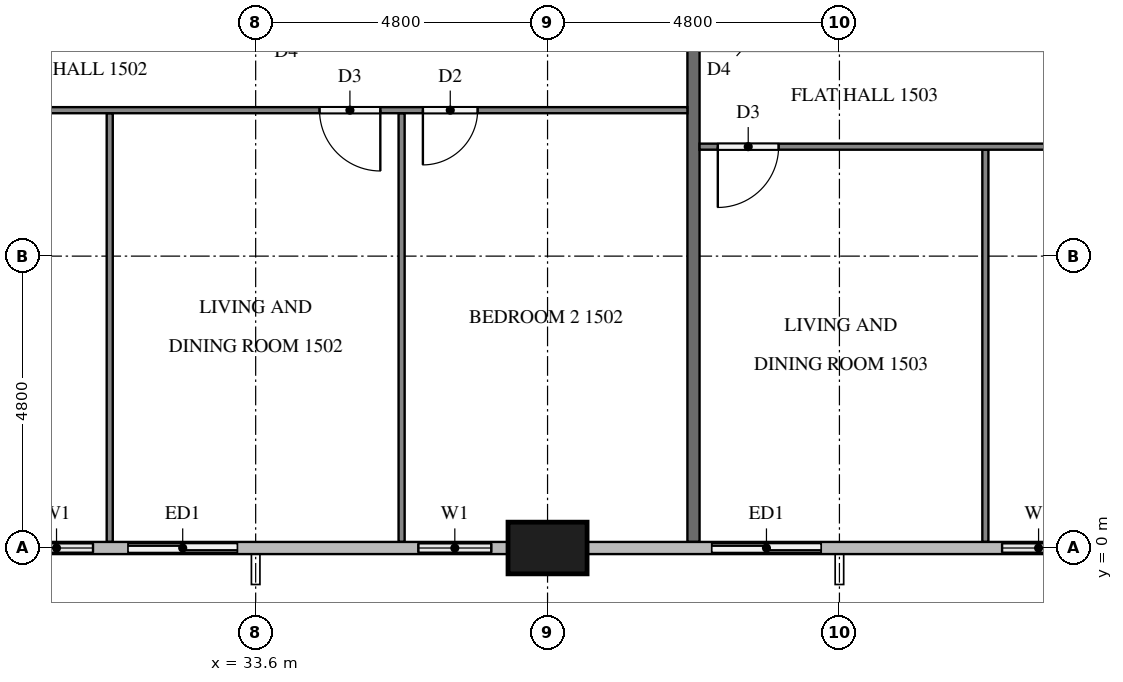
"""IFC4 building model, lengths in metres.
Left out: names, types, materials, properties, quantities, classifications, styles, units other than length and angle.
Written with IfcOpenShell. Run it as: python <this file> out.ifc"""

import sys

from ifc_helpers import new_model, si_unit, direction, frame, frame_2d, origin, origin_2d, place, context, subcontext, project, spatial, rectangle, extrude, element, fill, save


model = new_model("IFC4")
c1 = context("Model", 3, precision=1e-05, world=origin(), true_north=direction((0.0, 1.0)))
c2 = subcontext(c1, "Body", "Model", "MODEL_VIEW")
j1 = project(units=[si_unit("LENGTHUNIT", "METRE"), si_unit("PLANEANGLEUNIT", "RADIAN")], contexts=[c1])
p1 = place(None, origin())
s1 = spatial("IfcSite", under=j1, at=p1, CompositionType="ELEMENT")
p2 = place(p1, origin())
s2 = spatial("IfcBuilding", under=s1, at=p2, CompositionType="ELEMENT")
p3 = place(p2, frame((0.0, 0.0, 62.8)))
s3 = spatial("IfcBuildingStorey", under=s2, at=p3, CompositionType="ELEMENT", Elevation=62.8)
p4 = place(p3, frame((38.4, 0.0, 0.0), z_axis=(0.0, 0.0, 1.0), x_axis=(1.0, 0.0, 0.0)))
e1 = element("IfcColumn", 1, at=p4, inside=s3, PredefinedType="COLUMN", context=c2, shape_type="SweptSolid", body=[
    extrude(rectangle(XDim=1.3, YDim=0.85, at=origin_2d()), origin(), (0.0, 0.0, 1.0), 3.2),
])
p5 = place(p3, frame((29.45, 0.0, 0.0), z_axis=(0.0, 0.0, 1.0), x_axis=(1.0, 0.0, 0.0)))
e2 = element("IfcWall", 2, at=p5, inside=s3, PredefinedType="SOLIDWALL", context=c2, shape_type="SweptSolid", body=[
    extrude(rectangle(XDim=4.15, YDim=0.15, at=frame_2d((2.075, 0.0))), origin(), (0.0, 0.0, 1.0), 3.2),
])
p6 = place(p5, frame((0.275, 0.0, 0.9)))
e3 = element("IfcOpeningElement", 3, at=p6, cuts=e2, PredefinedType="OPENING", context=c2, shape_type="SweptSolid", body=[
    extrude(rectangle(XDim=1.2, YDim=1.4, at=frame_2d((0.6, 0.7))), frame((0.0, 0.085, 0.0), z_axis=(0.0, -1.0, 0.0), x_axis=(1.0, 0.0, 0.0)), (0.0, 0.0, 1.0), 0.17),
])
p7 = place(p5, frame((2.05, 0.0, 0.0)))
e4 = element("IfcOpeningElement", 4, at=p7, cuts=e2, PredefinedType="OPENING", context=c2, shape_type="SweptSolid", body=[
    extrude(rectangle(XDim=1.8, YDim=2.4, at=frame_2d((0.9, 1.2))), frame((0.0, 0.085, 0.0), z_axis=(0.0, -1.0, 0.0), x_axis=(1.0, 0.0, 0.0)), (0.0, 0.0, 1.0), 0.17),
])
p8 = place(p3, frame((36.0, 0.0, 0.0), z_axis=(0.0, 0.0, 1.0), x_axis=(1.0, 0.0, 0.0)))
e5 = element("IfcWall", 5, at=p8, inside=s3, PredefinedType="SOLIDWALL", context=c2, shape_type="SweptSolid", body=[
    extrude(rectangle(XDim=1.75, YDim=0.15, at=frame_2d((0.875, 0.0))), origin(), (0.0, 0.0, 1.0), 3.2),
])
p9 = place(p8, frame((0.275, 0.0, 0.9)))
e6 = element("IfcOpeningElement", 6, at=p9, cuts=e5, PredefinedType="OPENING", context=c2, shape_type="SweptSolid", body=[
    extrude(rectangle(XDim=1.2, YDim=1.4, at=frame_2d((0.6, 0.7))), frame((0.0, 0.085, 0.0), z_axis=(0.0, -1.0, 0.0), x_axis=(1.0, 0.0, 0.0)), (0.0, 0.0, 1.0), 0.17),
])
p10 = place(p3, frame((40.8, 0.0, 0.0), z_axis=(0.0, 0.0, 1.0), x_axis=(1.0, 0.0, 0.0)))
e7 = element("IfcWall", 7, at=p10, inside=s3, PredefinedType="SOLIDWALL", context=c2, shape_type="SweptSolid", body=[
    extrude(rectangle(XDim=2.4, YDim=0.15, at=frame_2d((1.2, 0.0))), origin(), (0.0, 0.0, 1.0), 3.2),
])
p11 = place(p10, frame((0.3, 0.0, 0.0)))
e8 = element("IfcOpeningElement", 8, at=p11, cuts=e7, PredefinedType="OPENING", context=c2, shape_type="SweptSolid", body=[
    extrude(rectangle(XDim=1.8, YDim=2.4, at=frame_2d((0.9, 1.2))), frame((0.0, 0.085, 0.0), z_axis=(0.0, -1.0, 0.0), x_axis=(1.0, 0.0, 0.0)), (0.0, 0.0, 1.0), 0.17),
])
p12 = place(p3, frame((45.6, 0.0, 0.0), z_axis=(0.0, 0.0, 1.0), x_axis=(1.0, 0.0, 0.0)))
e9 = element("IfcWall", 9, at=p12, inside=s3, PredefinedType="SOLIDWALL", context=c2, shape_type="SweptSolid", body=[
    extrude(rectangle(XDim=1.75, YDim=0.15, at=frame_2d((0.875, 0.0))), origin(), (0.0, 0.0, 1.0), 3.2),
])
p13 = place(p12, frame((0.275, 0.0, 0.9)))
e10 = element("IfcOpeningElement", 10, at=p13, cuts=e9, PredefinedType="OPENING", context=c2, shape_type="SweptSolid", body=[
    extrude(rectangle(XDim=1.2, YDim=1.4, at=frame_2d((0.6, 0.7))), frame((0.0, 0.085, 0.0), z_axis=(0.0, -1.0, 0.0), x_axis=(1.0, 0.0, 0.0)), (0.0, 0.0, 1.0), 0.17),
])
p14 = place(p3, frame((40.8, 11.9, 0.0), z_axis=(0.0, 0.0, 1.0), x_axis=(0.0, -1.0, 0.0)))
e11 = element("IfcWall", 11, at=p14, inside=s3, PredefinedType="PARTITIONING", context=c2, shape_type="SweptSolid", body=[
    extrude(rectangle(XDim=11.8, YDim=0.2, at=frame_2d((5.9, 0.0))), origin(), (0.0, 0.0, 1.0), 3.2),
])
for number, where, z_axis, x_axis in (
    (12, (31.2, 7.15, 0.0), (0.0, 0.0, 1.0), (0.0, -1.0, 0.0)),
    (13, (36.0, 7.15, 0.0), (0.0, 0.0, 1.0), (0.0, -1.0, 0.0)),
):
    element("IfcWall", number, at=place(p3, frame(where, z_axis=z_axis, x_axis=x_axis)), inside=s3, PredefinedType="PARTITIONING", context=c2, shape_type="SweptSolid", body=[
        extrude(rectangle(XDim=7.05, YDim=0.1, at=frame_2d((3.525, 0.0))), origin(), (0.0, 0.0, 1.0), 3.2),
    ])
p15 = place(p3, frame((40.7, 7.2, 0.0), z_axis=(0.0, 0.0, 1.0), x_axis=(-1.0, 0.0, 0.0)))
e14 = element("IfcWall", 14, at=p15, inside=s3, PredefinedType="PARTITIONING", context=c2, shape_type="SweptSolid", body=[
    extrude(rectangle(XDim=14.2, YDim=0.1, at=frame_2d((7.1, 0.0))), origin(), (0.0, 0.0, 1.0), 3.2),
])
p16 = place(p15, frame((13.0, 0.0, 0.0)))
e15 = element("IfcOpeningElement", 15, at=p16, cuts=e14, PredefinedType="OPENING", context=c2, shape_type="SweptSolid", body=[
    extrude(rectangle(XDim=0.9, YDim=2.1, at=frame_2d((0.45, 1.05))), frame((0.0, 0.06, 0.0), z_axis=(0.0, -1.0, 0.0), x_axis=(1.0, 0.0, 0.0)), (0.0, 0.0, 1.0), 0.12),
])
p17 = place(p15, frame((5.05, 0.0, 0.0)))
e16 = element("IfcOpeningElement", 16, at=p17, cuts=e14, PredefinedType="OPENING", context=c2, shape_type="SweptSolid", body=[
    extrude(rectangle(XDim=1.0, YDim=2.1, at=frame_2d((0.5, 1.05))), frame((0.0, 0.06, 0.0), z_axis=(0.0, -1.0, 0.0), x_axis=(1.0, 0.0, 0.0)), (0.0, 0.0, 1.0), 0.12),
])
p18 = place(p15, frame((3.45, 0.0, 0.0)))
e17 = element("IfcOpeningElement", 17, at=p18, cuts=e14, PredefinedType="OPENING", context=c2, shape_type="SweptSolid", body=[
    extrude(rectangle(XDim=0.9, YDim=2.1, at=frame_2d((0.45, 1.05))), frame((0.0, 0.06, 0.0), z_axis=(0.0, -1.0, 0.0), x_axis=(1.0, 0.0, 0.0)), (0.0, 0.0, 1.0), 0.12),
])
p19 = place(p3, frame((45.6, 6.55, 0.0), z_axis=(0.0, 0.0, 1.0), x_axis=(0.0, -1.0, 0.0)))
e18 = element("IfcWall", 18, at=p19, inside=s3, PredefinedType="PARTITIONING", context=c2, shape_type="SweptSolid", body=[
    extrude(rectangle(XDim=6.45, YDim=0.1, at=frame_2d((3.225, 0.0))), origin(), (0.0, 0.0, 1.0), 3.2),
])
p20 = place(p3, frame((50.3, 6.6, 0.0), z_axis=(0.0, 0.0, 1.0), x_axis=(-1.0, 0.0, 0.0)))
e19 = element("IfcWall", 19, at=p20, inside=s3, PredefinedType="PARTITIONING", context=c2, shape_type="SweptSolid", body=[
    extrude(rectangle(XDim=9.4, YDim=0.1, at=frame_2d((4.7, 0.0))), origin(), (0.0, 0.0, 1.0), 3.2),
])
p21 = place(p20, frame((0.3, 0.0, 0.0)))
e20 = element("IfcOpeningElement", 20, at=p21, cuts=e19, PredefinedType="OPENING", context=c2, shape_type="SweptSolid", body=[
    extrude(rectangle(XDim=0.9, YDim=2.1, at=frame_2d((0.45, 1.05))), frame((0.0, 0.06, 0.0), z_axis=(0.0, -1.0, 0.0), x_axis=(1.0, 0.0, 0.0)), (0.0, 0.0, 1.0), 0.12),
])
p22 = place(p20, frame((8.1, 0.0, 0.0)))
e21 = element("IfcOpeningElement", 21, at=p22, cuts=e19, PredefinedType="OPENING", context=c2, shape_type="SweptSolid", body=[
    extrude(rectangle(XDim=1.0, YDim=2.1, at=frame_2d((0.5, 1.05))), frame((0.0, 0.06, 0.0), z_axis=(0.0, -1.0, 0.0), x_axis=(1.0, 0.0, 0.0)), (0.0, 0.0, 1.0), 0.12),
])
p23 = place(p6, origin())
e22 = element("IfcWindow", 22, at=p23, inside=s3, PartitioningType="SINGLE_PANEL", PredefinedType="WINDOW", context=c2, shape_type="SweptSolid", body=[
    extrude(rectangle(XDim=1.2, YDim=1.4, at=frame_2d((0.6, 0.7))), frame((0.0, 0.03, 0.0), z_axis=(0.0, -1.0, 0.0), x_axis=(1.0, 0.0, 0.0)), (0.0, 0.0, 1.0), 0.06),
])
fill(e3, e22)
p24 = place(p7, origin())
e23 = element("IfcDoor", 23, at=p24, inside=s3, OperationType="SLIDING_TO_LEFT", PredefinedType="DOOR", context=c2, shape_type="SweptSolid", body=[
    extrude(rectangle(XDim=1.8, YDim=2.4, at=frame_2d((0.9, 1.2))), frame((0.0, 0.025, 0.0), z_axis=(0.0, -1.0, 0.0), x_axis=(1.0, 0.0, 0.0)), (0.0, 0.0, 1.0), 0.05),
])
fill(e4, e23)
p25 = place(p9, origin())
e24 = element("IfcWindow", 24, at=p25, inside=s3, PartitioningType="SINGLE_PANEL", PredefinedType="WINDOW", context=c2, shape_type="SweptSolid", body=[
    extrude(rectangle(XDim=1.2, YDim=1.4, at=frame_2d((0.6, 0.7))), frame((0.0, 0.03, 0.0), z_axis=(0.0, -1.0, 0.0), x_axis=(1.0, 0.0, 0.0)), (0.0, 0.0, 1.0), 0.06),
])
fill(e6, e24)
p26 = place(p11, origin())
e25 = element("IfcDoor", 25, at=p26, inside=s3, OperationType="SLIDING_TO_RIGHT", PredefinedType="DOOR", context=c2, shape_type="SweptSolid", body=[
    extrude(rectangle(XDim=1.8, YDim=2.4, at=frame_2d((0.9, 1.2))), frame((0.0, 0.025, 0.0), z_axis=(0.0, -1.0, 0.0), x_axis=(1.0, 0.0, 0.0)), (0.0, 0.0, 1.0), 0.05),
])
fill(e8, e25)
p27 = place(p13, origin())
e26 = element("IfcWindow", 26, at=p27, inside=s3, PartitioningType="SINGLE_PANEL", PredefinedType="WINDOW", context=c2, shape_type="SweptSolid", body=[
    extrude(rectangle(XDim=1.2, YDim=1.4, at=frame_2d((0.6, 0.7))), frame((0.0, 0.03, 0.0), z_axis=(0.0, -1.0, 0.0), x_axis=(1.0, 0.0, 0.0)), (0.0, 0.0, 1.0), 0.06),
])
fill(e10, e26)
p28 = place(p17, origin())
e27 = element("IfcDoor", 27, at=p28, inside=s3, OperationType="SINGLE_SWING_LEFT", PredefinedType="DOOR", context=c2, shape_type="SweptSolid", body=[
    extrude(rectangle(XDim=1.0, YDim=2.1, at=frame_2d((0.5, 1.05))), frame((0.0, 0.025, 0.0), z_axis=(0.0, -1.0, 0.0), x_axis=(1.0, 0.0, 0.0)), (0.0, 0.0, 1.0), 0.05),
])
fill(e16, e27)
p29 = place(p18, origin())
e28 = element("IfcDoor", 28, at=p29, inside=s3, OperationType="SINGLE_SWING_RIGHT", PredefinedType="DOOR", context=c2, shape_type="SweptSolid", body=[
    extrude(rectangle(XDim=0.9, YDim=2.1, at=frame_2d((0.45, 1.05))), frame((0.0, 0.025, 0.0), z_axis=(0.0, -1.0, 0.0), x_axis=(1.0, 0.0, 0.0)), (0.0, 0.0, 1.0), 0.05),
])
fill(e17, e28)
p30 = place(p22, origin())
e29 = element("IfcDoor", 29, at=p30, inside=s3, OperationType="SINGLE_SWING_RIGHT", PredefinedType="DOOR", context=c2, shape_type="SweptSolid", body=[
    extrude(rectangle(XDim=1.0, YDim=2.1, at=frame_2d((0.5, 1.05))), frame((0.0, 0.025, 0.0), z_axis=(0.0, -1.0, 0.0), x_axis=(1.0, 0.0, 0.0)), (0.0, 0.0, 1.0), 0.05),
])
fill(e21, e29)
save(model, sys.argv[1])
